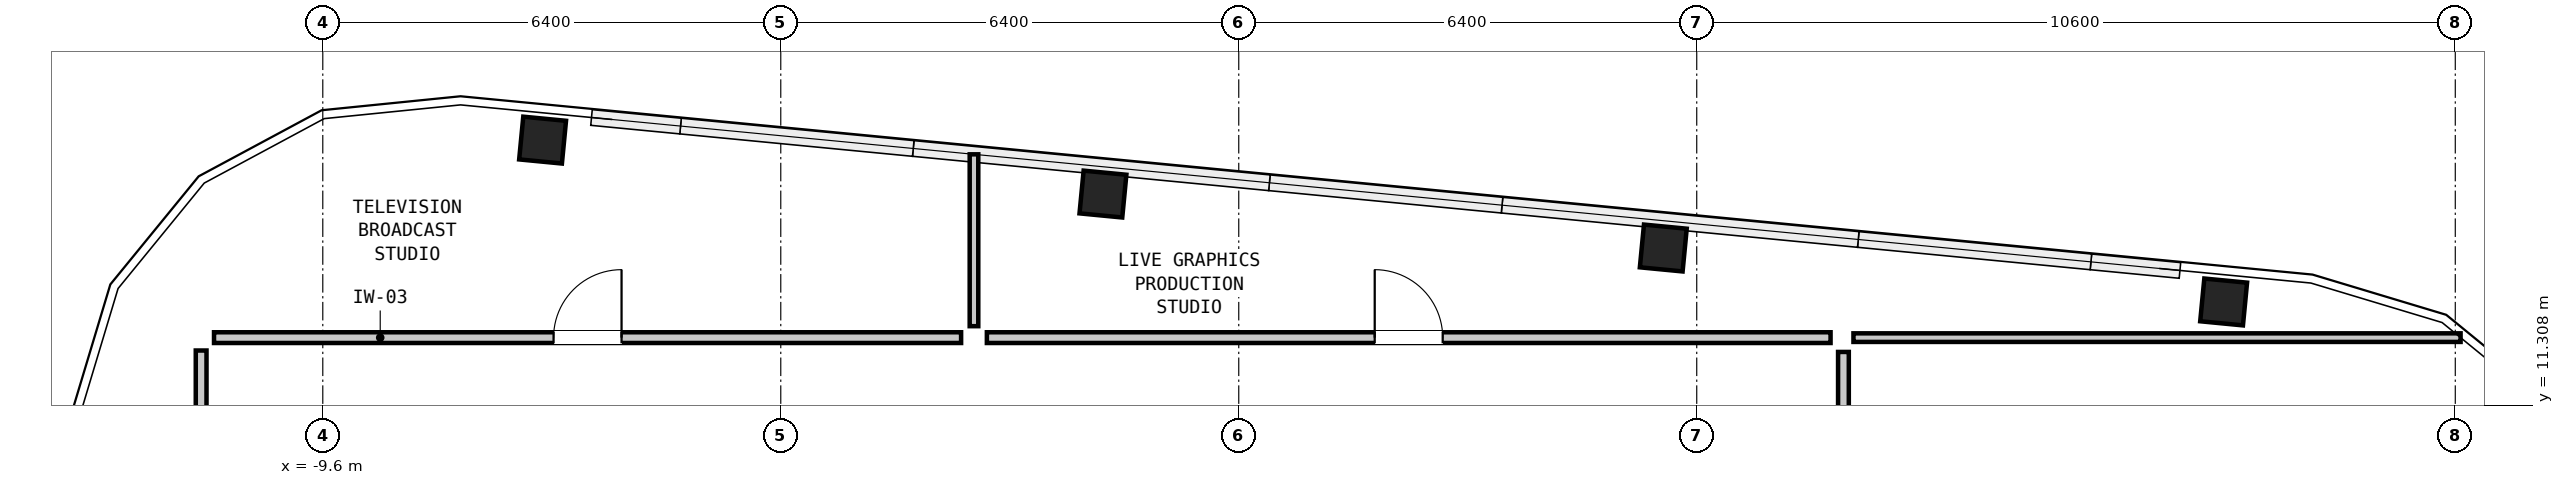
"""IFC4 building model, lengths in metres.
Left out: names, types, materials, properties, quantities, classifications, styles, units other than length and angle.
Written with IfcOpenShell. Run it as: python <this file> out.ifc"""

import sys

from ifc_helpers import new_model, si_unit, direction, frame, frame_2d, origin, origin_2d, place, context, subcontext, project, spatial, rectangle, hollow_rectangle, extrude, element, fill, save


model = new_model("IFC4")
c1 = context("Model", 3, precision=1e-05, world=origin(), true_north=direction((0.0, 1.0)))
c2 = subcontext(c1, "Body", "Model", "MODEL_VIEW")
j1 = project(units=[si_unit("LENGTHUNIT", "METRE"), si_unit("PLANEANGLEUNIT", "RADIAN")], contexts=[c1])
p1 = place(None, origin())
s1 = spatial("IfcSite", under=j1, at=p1, CompositionType="ELEMENT")
p2 = place(p1, origin())
s2 = spatial("IfcBuilding", under=s1, at=p2, CompositionType="ELEMENT")
p3 = place(p2, frame((0.0, 0.0, 245.9)))
s3 = spatial("IfcBuildingStorey", under=s2, at=p3, CompositionType="ELEMENT", Elevation=245.9)
for number, where, z_axis, x_axis in (
    (1, (16.963, 12.749, 0.0), (0.0, 0.0, 1.0), (0.995, -0.096, 0.0)),
    (2, (9.133, 13.502, 0.0), (0.0, 0.0, 1.0), (0.995, -0.096, 0.0)),
    (3, (1.302, 14.256, 0.0), (0.0, 0.0, 1.0), (0.995, -0.096, 0.0)),
    (4, (-6.528, 15.01, 0.0), (0.0, 0.0, 1.0), (0.995, -0.096, 0.0)),
):
    element("IfcColumn", number, at=place(p3, frame(where, z_axis=z_axis, x_axis=x_axis)), inside=s3, PredefinedType="COLUMN", context=c2, shape_type="SweptSolid", body=[
        extrude(hollow_rectangle(XDim=0.6, YDim=0.6, WallThickness=0.04, at=origin_2d()), origin(), (0.0, 0.0, 1.0), 3.05),
    ])
p4 = place(p3, frame((11.79, 12.25, 0.0), z_axis=(0.0, 0.0, 1.0), x_axis=(1.0, 0.0, 0.0)))
e5 = element("IfcWall", 5, at=p4, inside=s3, PredefinedType="PARTITIONING", context=c2, shape_type="SweptSolid", body=[
    extrude(rectangle(XDim=8.484, YDim=0.12, at=frame_2d((4.242, 0.0))), origin(), (0.0, 0.0, 1.0), 2.86),
])
p5 = place(p3, frame((-0.5, 12.41, 0.0), z_axis=(0.0, 0.0, 1.0), x_axis=(0.0, 1.0, 0.0)))
e6 = element("IfcWall", 6, at=p5, inside=s3, PredefinedType="PARTITIONING", context=c2, shape_type="SweptSolid", body=[
    extrude(rectangle(XDim=2.402, YDim=0.12, at=frame_2d((1.201, 0.0))), origin(), (0.0, 0.0, 1.0), 2.381),
])
p6 = place(p3, frame((-11.12, 12.25, 0.0), z_axis=(0.0, 0.0, 1.0), x_axis=(1.0, 0.0, 0.0)))
e7 = element("IfcWall", 7, at=p6, inside=s3, PredefinedType="PARTITIONING", context=c2, shape_type="SweptSolid", body=[
    extrude(rectangle(XDim=10.44, YDim=0.15, at=frame_2d((5.22, 0.0))), origin(), (0.0, 0.0, 1.0), 2.86),
])
p7 = place(p6, frame((4.745, 0.0, 0.0)))
e8 = element("IfcOpeningElement", 8, at=p7, cuts=e7, PredefinedType="OPENING", context=c2, shape_type="SweptSolid", body=[
    extrude(rectangle(XDim=0.95, YDim=2.1, at=frame_2d((0.475, 1.05))), frame((0.0, 0.087, 0.0), z_axis=(0.0, -1.0, 0.0), x_axis=(1.0, 0.0, 0.0)), (0.0, 0.0, 1.0), 0.174),
])
p8 = place(p3, frame((-0.32, 12.25, 0.0), z_axis=(0.0, 0.0, 1.0), x_axis=(1.0, 0.0, 0.0)))
e9 = element("IfcWall", 9, at=p8, inside=s3, PredefinedType="PARTITIONING", context=c2, shape_type="SweptSolid", body=[
    extrude(rectangle(XDim=11.79, YDim=0.15, at=frame_2d((5.895, 0.0))), origin(), (0.0, 0.0, 1.0), 2.86),
])
p9 = place(p8, frame((5.42, 0.0, 0.0)))
e10 = element("IfcOpeningElement", 10, at=p9, cuts=e9, PredefinedType="OPENING", context=c2, shape_type="SweptSolid", body=[
    extrude(rectangle(XDim=0.95, YDim=2.1, at=frame_2d((0.475, 1.05))), frame((0.0, 0.087, 0.0), z_axis=(0.0, -1.0, 0.0), x_axis=(1.0, 0.0, 0.0)), (0.0, 0.0, 1.0), 0.174),
])
p10 = place(p3, frame((-11.3, 12.07, 0.0), z_axis=(0.0, 0.0, 1.0), x_axis=(0.0, -1.0, 0.0)))
e11 = element("IfcWall", 11, at=p10, inside=s3, PredefinedType="PARTITIONING", context=c2, shape_type="SweptSolid", body=[
    extrude(rectangle(XDim=22.94, YDim=0.15, at=frame_2d((11.47, 0.0))), origin(), (0.0, 0.0, 1.0), 2.86),
])
p11 = place(p10, frame((19.253, 0.0, 0.0)))
e12 = element("IfcOpeningElement", 12, at=p11, cuts=e11, PredefinedType="OPENING", context=c2, shape_type="SweptSolid", body=[
    extrude(rectangle(XDim=0.95, YDim=2.1, at=frame_2d((0.475, 1.05))), frame((0.0, 0.087, 0.0), z_axis=(0.0, -1.0, 0.0), x_axis=(1.0, 0.0, 0.0)), (0.0, 0.0, 1.0), 0.174),
])
p12 = place(p3, frame((11.65, 3.8, 0.0), z_axis=(0.0, 0.0, 1.0), x_axis=(0.0, 1.0, 0.0)))
e13 = element("IfcWall", 13, at=p12, inside=s3, PredefinedType="PARTITIONING", context=c2, shape_type="SweptSolid", body=[
    extrude(rectangle(XDim=8.25, YDim=0.15, at=frame_2d((4.125, 0.0))), origin(), (0.0, 0.0, 1.0), 2.86),
])
p13 = place(p12, frame((3.65, 0.0, 0.0)))
e14 = element("IfcOpeningElement", 14, at=p13, cuts=e13, PredefinedType="OPENING", context=c2, shape_type="SweptSolid", body=[
    extrude(rectangle(XDim=0.95, YDim=2.1, at=frame_2d((0.475, 1.05))), frame((0.0, 0.087, 0.0), z_axis=(0.0, -1.0, 0.0), x_axis=(1.0, 0.0, 0.0)), (0.0, 0.0, 1.0), 0.174),
])
p14 = place(p7, origin())
e15 = element("IfcDoor", 15, at=p14, inside=s3, OperationType="SINGLE_SWING_RIGHT", PredefinedType="DOOR", context=c2, shape_type="SweptSolid", body=[
    extrude(rectangle(XDim=0.95, YDim=2.1, at=frame_2d((0.475, 1.05))), frame((0.0, 0.025, 0.0), z_axis=(0.0, -1.0, 0.0), x_axis=(1.0, 0.0, 0.0)), (0.0, 0.0, 1.0), 0.05),
])
fill(e8, e15)
p15 = place(p9, origin())
e16 = element("IfcDoor", 16, at=p15, inside=s3, OperationType="SINGLE_SWING_LEFT", PredefinedType="DOOR", context=c2, shape_type="SweptSolid", body=[
    extrude(rectangle(XDim=0.95, YDim=2.1, at=frame_2d((0.475, 1.05))), frame((0.0, 0.025, 0.0), z_axis=(0.0, -1.0, 0.0), x_axis=(1.0, 0.0, 0.0)), (0.0, 0.0, 1.0), 0.05),
])
fill(e10, e16)
save(model, sys.argv[1])
